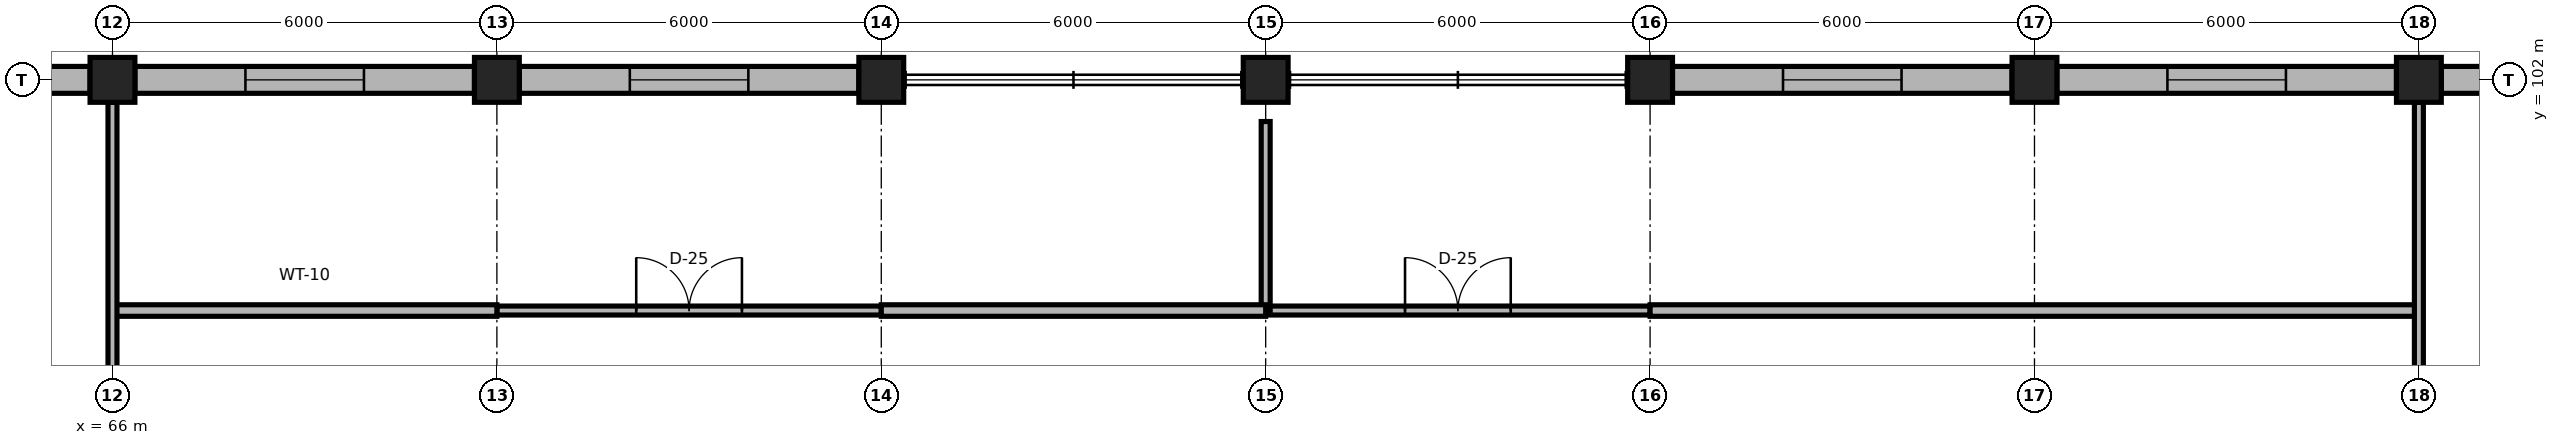
"""IFC4 building model, lengths in metres.
Left out: names, types, materials, properties, quantities, classifications, styles, units other than length and angle.
Written with IfcOpenShell. Run it as: python <this file> out.ifc"""

import sys

from ifc_helpers import new_model, si_unit, direction, frame, frame_2d, origin, origin_2d, place, context, subcontext, project, spatial, rectangle, extrude, element, fill, save


model = new_model("IFC4")
c1 = context("Model", 3, precision=1e-05, world=origin(), true_north=direction((0.0, 1.0)))
c2 = subcontext(c1, "Body", "Model", "MODEL_VIEW")
j1 = project(units=[si_unit("LENGTHUNIT", "METRE"), si_unit("PLANEANGLEUNIT", "RADIAN")], contexts=[c1])
p1 = place(None, origin())
s1 = spatial("IfcSite", under=j1, at=p1, CompositionType="ELEMENT")
p2 = place(p1, origin())
s2 = spatial("IfcBuilding", under=s1, at=p2, CompositionType="ELEMENT")
p3 = place(p2, frame((0.0, 0.0, 40.5)))
s3 = spatial("IfcBuildingStorey", under=s2, at=p3, CompositionType="ELEMENT", Elevation=40.5)
for number, where, z_axis, x_axis in (
    (1, (66.0, 102.0, 0.0), (0.0, 0.0, 1.0), (1.0, 0.0, 0.0)),
    (2, (72.0, 102.0, 0.0), (0.0, 0.0, 1.0), (1.0, 0.0, 0.0)),
    (3, (78.0, 102.0, 0.0), (0.0, 0.0, 1.0), (1.0, 0.0, 0.0)),
    (4, (84.0, 102.0, 0.0), (0.0, 0.0, 1.0), (1.0, 0.0, 0.0)),
    (5, (90.0, 102.0, 0.0), (0.0, 0.0, 1.0), (1.0, 0.0, 0.0)),
    (6, (96.0, 102.0, 0.0), (0.0, 0.0, 1.0), (1.0, 0.0, 0.0)),
    (7, (102.0, 102.0, 0.0), (0.0, 0.0, 1.0), (1.0, 0.0, 0.0)),
):
    element("IfcColumn", number, at=place(p3, frame(where, z_axis=z_axis, x_axis=x_axis)), inside=s3, PredefinedType="COLUMN", context=c2, shape_type="SweptSolid", body=[
        extrude(rectangle(XDim=0.7, YDim=0.7, at=origin_2d()), origin(), (0.0, 0.0, 1.0), 3.9),
    ])
p4 = place(p3, frame((60.35, 102.0, 0.0), z_axis=(0.0, 0.0, 1.0), x_axis=(1.0, 0.0, 0.0)))
e8 = element("IfcWall", 8, at=p4, inside=s3, PredefinedType="SOLIDWALL", context=c2, shape_type="SweptSolid", body=[
    extrude(rectangle(XDim=5.3, YDim=0.42, at=frame_2d((2.65, 0.0))), origin(), (0.0, 0.0, 1.0), 3.32),
])
p5 = place(p4, frame((1.725, 0.0, 0.85)))
e9 = element("IfcOpeningElement", 9, at=p5, cuts=e8, PredefinedType="OPENING", context=c2, shape_type="SweptSolid", body=[
    extrude(rectangle(XDim=1.85, YDim=2.0, at=frame_2d((0.925, 1.0))), frame((0.0, 0.225, 0.0), z_axis=(0.0, -1.0, 0.0), x_axis=(1.0, 0.0, 0.0)), (0.0, 0.0, 1.0), 0.45),
])
p6 = place(p3, frame((66.35, 102.0, 0.0), z_axis=(0.0, 0.0, 1.0), x_axis=(1.0, 0.0, 0.0)))
e10 = element("IfcWall", 10, at=p6, inside=s3, PredefinedType="SOLIDWALL", context=c2, shape_type="SweptSolid", body=[
    extrude(rectangle(XDim=5.3, YDim=0.42, at=frame_2d((2.65, 0.0))), origin(), (0.0, 0.0, 1.0), 3.32),
])
p7 = place(p6, frame((1.725, 0.0, 0.85)))
e11 = element("IfcOpeningElement", 11, at=p7, cuts=e10, PredefinedType="OPENING", context=c2, shape_type="SweptSolid", body=[
    extrude(rectangle(XDim=1.85, YDim=2.0, at=frame_2d((0.925, 1.0))), frame((0.0, 0.225, 0.0), z_axis=(0.0, -1.0, 0.0), x_axis=(1.0, 0.0, 0.0)), (0.0, 0.0, 1.0), 0.45),
])
p8 = place(p3, frame((72.35, 102.0, 0.0), z_axis=(0.0, 0.0, 1.0), x_axis=(1.0, 0.0, 0.0)))
e12 = element("IfcWall", 12, at=p8, inside=s3, PredefinedType="SOLIDWALL", context=c2, shape_type="SweptSolid", body=[
    extrude(rectangle(XDim=5.3, YDim=0.42, at=frame_2d((2.65, 0.0))), origin(), (0.0, 0.0, 1.0), 3.32),
])
p9 = place(p8, frame((1.725, 0.0, 0.85)))
e13 = element("IfcOpeningElement", 13, at=p9, cuts=e12, PredefinedType="OPENING", context=c2, shape_type="SweptSolid", body=[
    extrude(rectangle(XDim=1.85, YDim=2.0, at=frame_2d((0.925, 1.0))), frame((0.0, 0.225, 0.0), z_axis=(0.0, -1.0, 0.0), x_axis=(1.0, 0.0, 0.0)), (0.0, 0.0, 1.0), 0.45),
])
p10 = place(p3, frame((90.35, 102.0, 0.0), z_axis=(0.0, 0.0, 1.0), x_axis=(1.0, 0.0, 0.0)))
e14 = element("IfcWall", 14, at=p10, inside=s3, PredefinedType="SOLIDWALL", context=c2, shape_type="SweptSolid", body=[
    extrude(rectangle(XDim=5.3, YDim=0.42, at=frame_2d((2.65, 0.0))), origin(), (0.0, 0.0, 1.0), 3.32),
])
p11 = place(p10, frame((1.725, 0.0, 0.85)))
e15 = element("IfcOpeningElement", 15, at=p11, cuts=e14, PredefinedType="OPENING", context=c2, shape_type="SweptSolid", body=[
    extrude(rectangle(XDim=1.85, YDim=2.0, at=frame_2d((0.925, 1.0))), frame((0.0, 0.225, 0.0), z_axis=(0.0, -1.0, 0.0), x_axis=(1.0, 0.0, 0.0)), (0.0, 0.0, 1.0), 0.45),
])
p12 = place(p3, frame((96.35, 102.0, 0.0), z_axis=(0.0, 0.0, 1.0), x_axis=(1.0, 0.0, 0.0)))
e16 = element("IfcWall", 16, at=p12, inside=s3, PredefinedType="SOLIDWALL", context=c2, shape_type="SweptSolid", body=[
    extrude(rectangle(XDim=5.3, YDim=0.42, at=frame_2d((2.65, 0.0))), origin(), (0.0, 0.0, 1.0), 3.32),
])
p13 = place(p12, frame((1.725, 0.0, 0.85)))
e17 = element("IfcOpeningElement", 17, at=p13, cuts=e16, PredefinedType="OPENING", context=c2, shape_type="SweptSolid", body=[
    extrude(rectangle(XDim=1.85, YDim=2.0, at=frame_2d((0.925, 1.0))), frame((0.0, 0.225, 0.0), z_axis=(0.0, -1.0, 0.0), x_axis=(1.0, 0.0, 0.0)), (0.0, 0.0, 1.0), 0.45),
])
p14 = place(p3, frame((102.35, 102.0, 0.0), z_axis=(0.0, 0.0, 1.0), x_axis=(1.0, 0.0, 0.0)))
e18 = element("IfcWall", 18, at=p14, inside=s3, PredefinedType="SOLIDWALL", context=c2, shape_type="SweptSolid", body=[
    extrude(rectangle(XDim=5.3, YDim=0.42, at=frame_2d((2.65, 0.0))), origin(), (0.0, 0.0, 1.0), 3.32),
])
p15 = place(p14, frame((1.725, 0.0, 0.85)))
e19 = element("IfcOpeningElement", 19, at=p15, cuts=e18, PredefinedType="OPENING", context=c2, shape_type="SweptSolid", body=[
    extrude(rectangle(XDim=1.85, YDim=2.0, at=frame_2d((0.925, 1.0))), frame((0.0, 0.225, 0.0), z_axis=(0.0, -1.0, 0.0), x_axis=(1.0, 0.0, 0.0)), (0.0, 0.0, 1.0), 0.45),
])
p16 = place(p3, frame((72.0, 98.4, 0.0), z_axis=(0.0, 0.0, 1.0), x_axis=(1.0, 0.0, 0.0)))
e20 = element("IfcWall", 20, at=p16, inside=s3, PredefinedType="PARTITIONING", context=c2, shape_type="SweptSolid", body=[
    extrude(rectangle(XDim=6.0, YDim=0.14, at=frame_2d((3.0, 0.0))), origin(), (0.0, 0.0, 1.0), 3.74),
])
p17 = place(p16, frame((2.175, 0.0, 0.0)))
e21 = element("IfcOpeningElement", 21, at=p17, cuts=e20, PredefinedType="OPENING", context=c2, shape_type="SweptSolid", body=[
    extrude(rectangle(XDim=1.65, YDim=2.35, at=frame_2d((0.825, 1.175))), frame((0.0, 0.085, 0.0), z_axis=(0.0, -1.0, 0.0), x_axis=(1.0, 0.0, 0.0)), (0.0, 0.0, 1.0), 0.17),
])
p18 = place(p3, frame((84.0, 98.4, 0.0), z_axis=(0.0, 0.0, 1.0), x_axis=(1.0, 0.0, 0.0)))
e22 = element("IfcWall", 22, at=p18, inside=s3, PredefinedType="PARTITIONING", context=c2, shape_type="SweptSolid", body=[
    extrude(rectangle(XDim=6.0, YDim=0.14, at=frame_2d((3.0, 0.0))), origin(), (0.0, 0.0, 1.0), 3.74),
])
p19 = place(p18, frame((2.175, 0.0, 0.0)))
e23 = element("IfcOpeningElement", 23, at=p19, cuts=e22, PredefinedType="OPENING", context=c2, shape_type="SweptSolid", body=[
    extrude(rectangle(XDim=1.65, YDim=2.35, at=frame_2d((0.825, 1.175))), frame((0.0, 0.085, 0.0), z_axis=(0.0, -1.0, 0.0), x_axis=(1.0, 0.0, 0.0)), (0.0, 0.0, 1.0), 0.17),
])
p20 = place(p3, frame((84.0, 98.4, 0.0), z_axis=(0.0, 0.0, 1.0), x_axis=(0.0, 1.0, 0.0)))
e24 = element("IfcWall", 24, at=p20, inside=s3, PredefinedType="PARTITIONING", context=c2, shape_type="SweptSolid", body=[
    extrude(rectangle(XDim=2.95, YDim=0.14, at=frame_2d((1.475, 0.0))), origin(), (0.0, 0.0, 1.0), 3.348),
])
for number, where, z_axis, x_axis in (
    (25, (66.0, 98.4, 0.0), (0.0, 0.0, 1.0), (1.0, 0.0, 0.0)),
    (26, (78.0, 98.4, 0.0), (0.0, 0.0, 1.0), (1.0, 0.0, 0.0)),
):
    element("IfcWall", number, at=place(p3, frame(where, z_axis=z_axis, x_axis=x_axis)), inside=s3, PredefinedType="PARTITIONING", context=c2, shape_type="SweptSolid", body=[
        extrude(rectangle(XDim=6.0, YDim=0.18, at=frame_2d((3.0, 0.0))), origin(), (0.0, 0.0, 1.0), 3.74),
    ])
p21 = place(p3, frame((90.0, 98.4, 0.0), z_axis=(0.0, 0.0, 1.0), x_axis=(1.0, 0.0, 0.0)))
e27 = element("IfcWall", 27, at=p21, inside=s3, PredefinedType="PARTITIONING", context=c2, shape_type="SweptSolid", body=[
    extrude(rectangle(XDim=12.0, YDim=0.18, at=frame_2d((6.0, 0.0))), origin(), (0.0, 0.0, 1.0), 3.74),
])
for number, where, z_axis, x_axis in (
    (28, (66.0, 96.35, 0.0), (0.0, 0.0, 1.0), (0.0, 1.0, 0.0)),
    (29, (102.0, 96.35, 0.0), (0.0, 0.0, 1.0), (0.0, 1.0, 0.0)),
):
    element("IfcWall", number, at=place(p3, frame(where, z_axis=z_axis, x_axis=x_axis)), inside=s3, PredefinedType="PARTITIONING", context=c2, shape_type="SweptSolid", body=[
        extrude(rectangle(XDim=5.3, YDim=0.14, at=frame_2d((2.65, 0.0))), origin(), (0.0, 0.0, 1.0), 3.348),
    ])
p22 = place(p7, origin())
e30 = element("IfcWindow", 30, at=p22, inside=s3, PartitioningType="SINGLE_PANEL", PredefinedType="WINDOW", context=c2, shape_type="SweptSolid", body=[
    extrude(rectangle(XDim=1.85, YDim=2.0, at=frame_2d((0.925, 1.0))), frame((0.0, 0.03, 0.0), z_axis=(0.0, -1.0, 0.0), x_axis=(1.0, 0.0, 0.0)), (0.0, 0.0, 1.0), 0.06),
])
fill(e11, e30)
p23 = place(p9, origin())
e31 = element("IfcWindow", 31, at=p23, inside=s3, PartitioningType="SINGLE_PANEL", PredefinedType="WINDOW", context=c2, shape_type="SweptSolid", body=[
    extrude(rectangle(XDim=1.85, YDim=2.0, at=frame_2d((0.925, 1.0))), frame((0.0, 0.03, 0.0), z_axis=(0.0, -1.0, 0.0), x_axis=(1.0, 0.0, 0.0)), (0.0, 0.0, 1.0), 0.06),
])
fill(e13, e31)
p24 = place(p11, origin())
e32 = element("IfcWindow", 32, at=p24, inside=s3, PartitioningType="SINGLE_PANEL", PredefinedType="WINDOW", context=c2, shape_type="SweptSolid", body=[
    extrude(rectangle(XDim=1.85, YDim=2.0, at=frame_2d((0.925, 1.0))), frame((0.0, 0.03, 0.0), z_axis=(0.0, -1.0, 0.0), x_axis=(1.0, 0.0, 0.0)), (0.0, 0.0, 1.0), 0.06),
])
fill(e15, e32)
p25 = place(p13, origin())
e33 = element("IfcWindow", 33, at=p25, inside=s3, PartitioningType="SINGLE_PANEL", PredefinedType="WINDOW", context=c2, shape_type="SweptSolid", body=[
    extrude(rectangle(XDim=1.85, YDim=2.0, at=frame_2d((0.925, 1.0))), frame((0.0, 0.03, 0.0), z_axis=(0.0, -1.0, 0.0), x_axis=(1.0, 0.0, 0.0)), (0.0, 0.0, 1.0), 0.06),
])
fill(e17, e33)
p26 = place(p17, origin())
e34 = element("IfcDoor", 34, at=p26, inside=s3, OperationType="DOUBLE_DOOR_SINGLE_SWING", PredefinedType="DOOR", context=c2, shape_type="SweptSolid", body=[
    extrude(rectangle(XDim=1.65, YDim=2.35, at=frame_2d((0.825, 1.175))), frame((0.0, 0.025, 0.0), z_axis=(0.0, -1.0, 0.0), x_axis=(1.0, 0.0, 0.0)), (0.0, 0.0, 1.0), 0.05),
])
fill(e21, e34)
p27 = place(p19, origin())
e35 = element("IfcDoor", 35, at=p27, inside=s3, OperationType="DOUBLE_DOOR_SINGLE_SWING", PredefinedType="DOOR", context=c2, shape_type="SweptSolid", body=[
    extrude(rectangle(XDim=1.65, YDim=2.35, at=frame_2d((0.825, 1.175))), frame((0.0, 0.025, 0.0), z_axis=(0.0, -1.0, 0.0), x_axis=(1.0, 0.0, 0.0)), (0.0, 0.0, 1.0), 0.05),
])
fill(e23, e35)
save(model, sys.argv[1])
